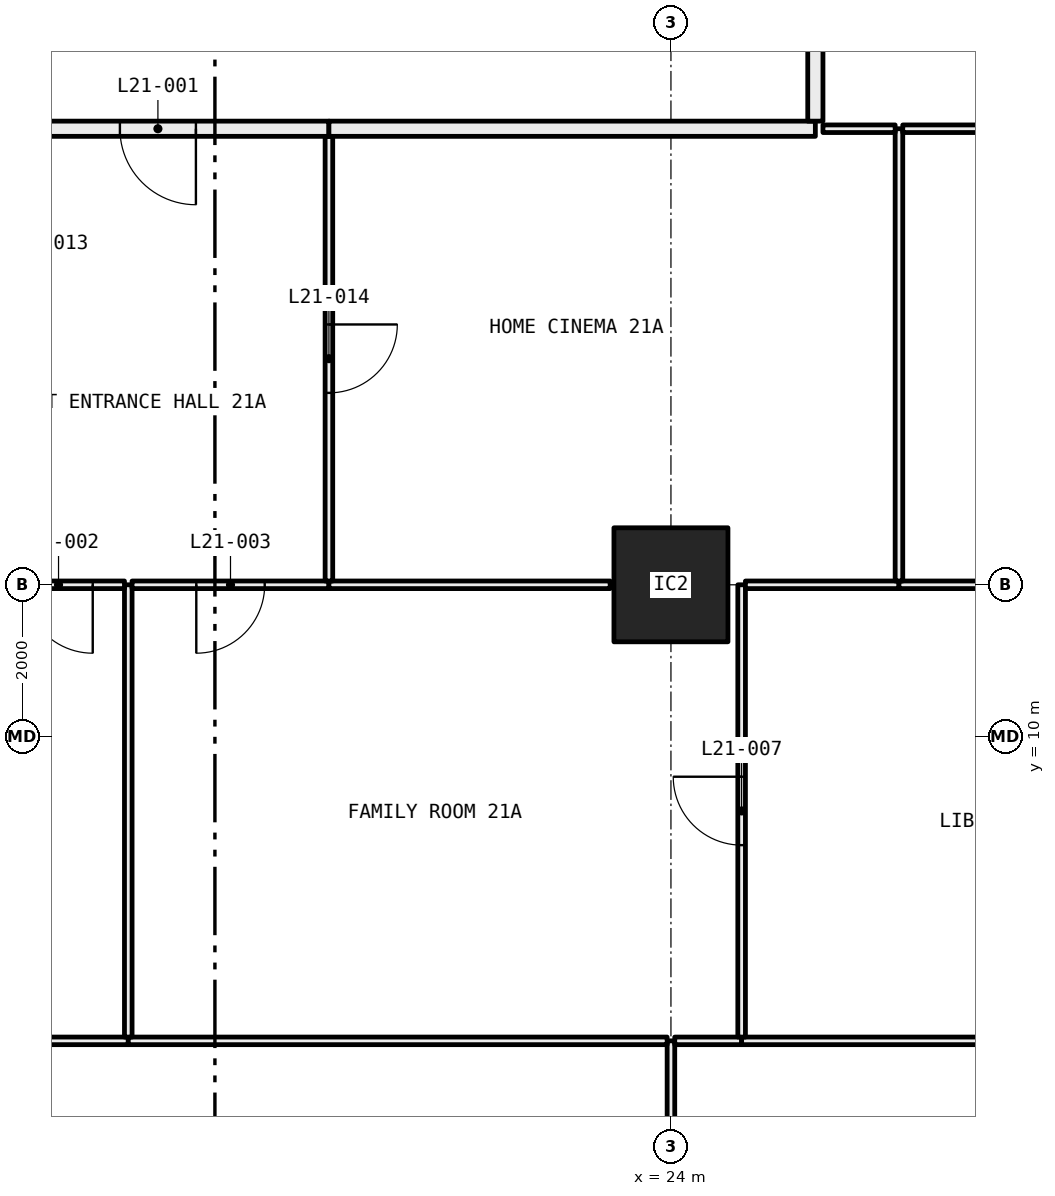
"""IFC4 building model, lengths in metres.
Left out: names, types, materials, properties, quantities, classifications, styles, units other than length and angle.
Written with IfcOpenShell. Run it as: python <this file> out.ifc"""

import sys

from ifc_helpers import new_model, si_unit, direction, frame, frame_2d, origin, origin_2d, place, context, subcontext, project, spatial, rectangle, hollow_rectangle, extrude, element, fill, save


model = new_model("IFC4")
c1 = context("Model", 3, precision=1e-05, world=origin(), true_north=direction((0.0, 1.0)))
c2 = subcontext(c1, "Body", "Model", "MODEL_VIEW")
j1 = project(units=[si_unit("LENGTHUNIT", "METRE"), si_unit("PLANEANGLEUNIT", "RADIAN")], contexts=[c1])
p1 = place(None, origin())
s1 = spatial("IfcSite", under=j1, at=p1, CompositionType="ELEMENT")
p2 = place(p1, origin())
s2 = spatial("IfcBuilding", under=s1, at=p2, CompositionType="ELEMENT")
p3 = place(p2, frame((0.0, 0.0, 85.2)))
s3 = spatial("IfcBuildingStorey", under=s2, at=p3, CompositionType="ELEMENT", Elevation=85.2)
p4 = place(p3, frame((24.0, 12.0, 0.0), z_axis=(0.0, 0.0, 1.0), x_axis=(1.0, 0.0, 0.0)))
e1 = element("IfcColumn", 1, at=p4, inside=s3, PredefinedType="COLUMN", context=c2, shape_type="SweptSolid", body=[
    extrude(hollow_rectangle(XDim=1.5, YDim=1.5, WallThickness=0.065, at=origin_2d()), origin(), (0.0, 0.0, 1.0), 3.05),
])
p5 = place(p3, frame((24.0, 0.72, 0.0), z_axis=(0.0, 0.0, 1.0), x_axis=(0.0, 1.0, 0.0)))
e2 = element("IfcWall", 2, at=p5, inside=s3, PredefinedType="PARTITIONING", context=c2, shape_type="SweptSolid", body=[
    extrude(rectangle(XDim=5.28, YDim=0.1, at=frame_2d((2.64, 0.0))), origin(), (0.0, 0.0, 1.0), 2.45),
])
p6 = place(p5, frame((2.19, 0.0, 0.0)))
e3 = element("IfcOpeningElement", 3, at=p6, cuts=e2, PredefinedType="OPENING", context=c2, shape_type="SweptSolid", body=[
    extrude(rectangle(XDim=0.9, YDim=2.1, at=frame_2d((0.45, 1.05))), frame((0.0, 0.06, 0.0), z_axis=(0.0, -1.0, 0.0), x_axis=(1.0, 0.0, 0.0)), (0.0, 0.0, 1.0), 0.12),
])
p7 = place(p3, frame((16.86, 6.0, 0.0), z_axis=(0.0, 0.0, 1.0), x_axis=(-1.0, 0.0, 0.0)))
e4 = element("IfcWall", 4, at=p7, inside=s3, PredefinedType="PARTITIONING", context=c2, shape_type="SweptSolid", body=[
    extrude(rectangle(XDim=4.81, YDim=0.1, at=frame_2d((2.405, 0.0))), origin(), (0.0, 0.0, 1.0), 2.45),
])
p8 = place(p7, frame((1.955, 0.0, 0.0)))
e5 = element("IfcOpeningElement", 5, at=p8, cuts=e4, PredefinedType="OPENING", context=c2, shape_type="SweptSolid", body=[
    extrude(rectangle(XDim=0.9, YDim=2.1, at=frame_2d((0.45, 1.05))), frame((0.0, 0.06, 0.0), z_axis=(0.0, -1.0, 0.0), x_axis=(1.0, 0.0, 0.0)), (0.0, 0.0, 1.0), 0.12),
])
p9 = place(p3, frame((23.95, 6.0, 0.0), z_axis=(0.0, 0.0, 1.0), x_axis=(-1.0, 0.0, 0.0)))
e6 = element("IfcWall", 6, at=p9, inside=s3, PredefinedType="PARTITIONING", context=c2, shape_type="SweptSolid", body=[
    extrude(rectangle(XDim=7.09, YDim=0.1, at=frame_2d((3.545, 0.0))), origin(), (0.0, 0.0, 1.0), 2.45),
])
p10 = place(p3, frame((24.93, 6.0, 0.0), z_axis=(0.0, 0.0, 1.0), x_axis=(-1.0, 0.0, 0.0)))
e7 = element("IfcWall", 7, at=p10, inside=s3, PredefinedType="PARTITIONING", context=c2, shape_type="SweptSolid", body=[
    extrude(rectangle(XDim=0.88, YDim=0.1, at=frame_2d((0.44, 0.0))), origin(), (0.0, 0.0, 1.0), 2.45),
])
p11 = place(p3, frame((29.95, 6.0, 0.0), z_axis=(0.0, 0.0, 1.0), x_axis=(-1.0, 0.0, 0.0)))
e8 = element("IfcWall", 8, at=p11, inside=s3, PredefinedType="PARTITIONING", context=c2, shape_type="SweptSolid", body=[
    extrude(rectangle(XDim=5.02, YDim=0.1, at=frame_2d((2.51, 0.0))), origin(), (0.0, 0.0, 1.0), 3.05),
])
p12 = place(p3, frame((16.86, 6.05, 0.0), z_axis=(0.0, 0.0, 1.0), x_axis=(0.0, 1.0, 0.0)))
e9 = element("IfcWall", 9, at=p12, inside=s3, PredefinedType="PARTITIONING", context=c2, shape_type="SweptSolid", body=[
    extrude(rectangle(XDim=5.95, YDim=0.1, at=frame_2d((2.975, 0.0))), origin(), (0.0, 0.0, 1.0), 2.45),
])
p13 = place(p3, frame((16.81, 12.0, 0.0), z_axis=(0.0, 0.0, 1.0), x_axis=(-1.0, 0.0, 0.0)))
e10 = element("IfcWall", 10, at=p13, inside=s3, PredefinedType="PARTITIONING", context=c2, shape_type="SweptSolid", body=[
    extrude(rectangle(XDim=1.735, YDim=0.1, at=frame_2d((0.868, 0.0))), origin(), (0.0, 0.0, 1.0), 2.45),
])
p14 = place(p13, frame((0.417, 0.0, 0.0)))
e11 = element("IfcOpeningElement", 11, at=p14, cuts=e10, PredefinedType="OPENING", context=c2, shape_type="SweptSolid", body=[
    extrude(rectangle(XDim=0.9, YDim=2.1, at=frame_2d((0.45, 1.05))), frame((0.0, 0.06, 0.0), z_axis=(0.0, -1.0, 0.0), x_axis=(1.0, 0.0, 0.0)), (0.0, 0.0, 1.0), 0.12),
])
p15 = place(p3, frame((24.93, 6.05, 0.0), z_axis=(0.0, 0.0, 1.0), x_axis=(0.0, 1.0, 0.0)))
e12 = element("IfcWall", 12, at=p15, inside=s3, PredefinedType="PARTITIONING", context=c2, shape_type="SweptSolid", body=[
    extrude(rectangle(XDim=5.95, YDim=0.1, at=frame_2d((2.975, 0.0))), origin(), (0.0, 0.0, 1.0), 2.45),
])
p16 = place(p15, frame((2.525, 0.0, 0.0)))
e13 = element("IfcOpeningElement", 13, at=p16, cuts=e12, PredefinedType="OPENING", context=c2, shape_type="SweptSolid", body=[
    extrude(rectangle(XDim=0.9, YDim=2.1, at=frame_2d((0.45, 1.05))), frame((0.0, 0.06, 0.0), z_axis=(0.0, -1.0, 0.0), x_axis=(1.0, 0.0, 0.0)), (0.0, 0.0, 1.0), 0.12),
])
p17 = place(p3, frame((19.5, 12.0, 0.0), z_axis=(0.0, 0.0, 1.0), x_axis=(-1.0, 0.0, 0.0)))
e14 = element("IfcWall", 14, at=p17, inside=s3, PredefinedType="PARTITIONING", context=c2, shape_type="SweptSolid", body=[
    extrude(rectangle(XDim=2.59, YDim=0.1, at=frame_2d((1.295, 0.0))), origin(), (0.0, 0.0, 1.0), 2.45),
])
p18 = place(p17, frame((0.845, 0.0, 0.0)))
e15 = element("IfcOpeningElement", 15, at=p18, cuts=e14, PredefinedType="OPENING", context=c2, shape_type="SweptSolid", body=[
    extrude(rectangle(XDim=0.9, YDim=2.1, at=frame_2d((0.45, 1.05))), frame((0.0, 0.06, 0.0), z_axis=(0.0, -1.0, 0.0), x_axis=(1.0, 0.0, 0.0)), (0.0, 0.0, 1.0), 0.12),
])
p19 = place(p3, frame((23.2, 12.0, 0.0), z_axis=(0.0, 0.0, 1.0), x_axis=(-1.0, 0.0, 0.0)))
e16 = element("IfcWall", 16, at=p19, inside=s3, PredefinedType="PARTITIONING", context=c2, shape_type="SweptSolid", body=[
    extrude(rectangle(XDim=3.7, YDim=0.1, at=frame_2d((1.85, 0.0))), origin(), (0.0, 0.0, 1.0), 2.45),
])
p20 = place(p3, frame((27.0, 12.0, 0.0), z_axis=(0.0, 0.0, 1.0), x_axis=(-1.0, 0.0, 0.0)))
e17 = element("IfcWall", 17, at=p20, inside=s3, PredefinedType="PARTITIONING", context=c2, shape_type="SweptSolid", body=[
    extrude(rectangle(XDim=2.02, YDim=0.1, at=frame_2d((1.01, 0.0))), origin(), (0.0, 0.0, 1.0), 2.45),
])
p21 = place(p3, frame((32.95, 12.0, 0.0), z_axis=(0.0, 0.0, 1.0), x_axis=(-1.0, 0.0, 0.0)))
e18 = element("IfcWall", 18, at=p21, inside=s3, PredefinedType="PARTITIONING", context=c2, shape_type="SweptSolid", body=[
    extrude(rectangle(XDim=5.95, YDim=0.1, at=frame_2d((2.975, 0.0))), origin(), (0.0, 0.0, 1.0), 2.45),
])
p22 = place(p21, frame((2.525, 0.0, 0.0)))
e19 = element("IfcOpeningElement", 19, at=p22, cuts=e18, PredefinedType="OPENING", context=c2, shape_type="SweptSolid", body=[
    extrude(rectangle(XDim=0.9, YDim=2.1, at=frame_2d((0.45, 1.05))), frame((0.0, 0.06, 0.0), z_axis=(0.0, -1.0, 0.0), x_axis=(1.0, 0.0, 0.0)), (0.0, 0.0, 1.0), 0.12),
])
p23 = place(p3, frame((19.5, 12.05, 0.0), z_axis=(0.0, 0.0, 1.0), x_axis=(0.0, 1.0, 0.0)))
e20 = element("IfcWall", 20, at=p23, inside=s3, PredefinedType="PARTITIONING", context=c2, shape_type="SweptSolid", body=[
    extrude(rectangle(XDim=5.85, YDim=0.1, at=frame_2d((2.925, 0.0))), origin(), (0.0, 0.0, 1.0), 2.45),
])
p24 = place(p23, frame((2.475, 0.0, 0.0)))
e21 = element("IfcOpeningElement", 21, at=p24, cuts=e20, PredefinedType="OPENING", context=c2, shape_type="SweptSolid", body=[
    extrude(rectangle(XDim=0.9, YDim=2.1, at=frame_2d((0.45, 1.05))), frame((0.0, 0.06, 0.0), z_axis=(0.0, -1.0, 0.0), x_axis=(1.0, 0.0, 0.0)), (0.0, 0.0, 1.0), 0.12),
])
p25 = place(p3, frame((19.5, 18.0, 0.0), z_axis=(0.0, 0.0, 1.0), x_axis=(-1.0, 0.0, 0.0)))
e22 = element("IfcWall", 22, at=p25, inside=s3, PredefinedType="PARTITIONING", context=c2, shape_type="SweptSolid", body=[
    extrude(rectangle(XDim=4.5, YDim=0.2, at=frame_2d((2.25, 0.0))), origin(), (0.0, 0.0, 1.0), 3.05),
])
p26 = place(p25, frame((1.75, 0.0, 0.0)))
e23 = element("IfcOpeningElement", 23, at=p26, cuts=e22, PredefinedType="OPENING", context=c2, shape_type="SweptSolid", body=[
    extrude(rectangle(XDim=1.0, YDim=2.1, at=frame_2d((0.5, 1.05))), frame((0.0, 0.11, 0.0), z_axis=(0.0, -1.0, 0.0), x_axis=(1.0, 0.0, 0.0)), (0.0, 0.0, 1.0), 0.22),
])
p27 = place(p3, frame((27.0, 12.05, 0.0), z_axis=(0.0, 0.0, 1.0), x_axis=(0.0, 1.0, 0.0)))
e24 = element("IfcWall", 24, at=p27, inside=s3, PredefinedType="PARTITIONING", context=c2, shape_type="SweptSolid", body=[
    extrude(rectangle(XDim=5.95, YDim=0.1, at=frame_2d((2.975, 0.0))), origin(), (0.0, 0.0, 1.0), 2.45),
])
p28 = place(p3, frame((26.95, 18.0, 0.0), z_axis=(0.0, 0.0, 1.0), x_axis=(-1.0, 0.0, 0.0)))
e25 = element("IfcWall", 25, at=p28, inside=s3, PredefinedType="PARTITIONING", context=c2, shape_type="SweptSolid", body=[
    extrude(rectangle(XDim=0.95, YDim=0.1, at=frame_2d((0.475, 0.0))), origin(), (0.0, 0.0, 1.0), 3.05),
])
p29 = place(p3, frame((25.9, 18.0, 0.0), z_axis=(0.0, 0.0, 1.0), x_axis=(-1.0, 0.0, 0.0)))
e26 = element("IfcWall", 26, at=p29, inside=s3, PredefinedType="PARTITIONING", context=c2, shape_type="SweptSolid", body=[
    extrude(rectangle(XDim=6.4, YDim=0.2, at=frame_2d((3.2, 0.0))), origin(), (0.0, 0.0, 1.0), 3.05),
])
p30 = place(p3, frame((30.0, 18.0, 0.0), z_axis=(0.0, 0.0, 1.0), x_axis=(-1.0, 0.0, 0.0)))
e27 = element("IfcWall", 27, at=p30, inside=s3, PredefinedType="PARTITIONING", context=c2, shape_type="SweptSolid", body=[
    extrude(rectangle(XDim=2.95, YDim=0.1, at=frame_2d((1.475, 0.0))), origin(), (0.0, 0.0, 1.0), 3.05),
])
p31 = place(p30, frame((1.025, 0.0, 0.0)))
e28 = element("IfcOpeningElement", 28, at=p31, cuts=e27, PredefinedType="OPENING", context=c2, shape_type="SweptSolid", body=[
    extrude(rectangle(XDim=0.9, YDim=2.1, at=frame_2d((0.45, 1.05))), frame((0.0, 0.06, 0.0), z_axis=(0.0, -1.0, 0.0), x_axis=(1.0, 0.0, 0.0)), (0.0, 0.0, 1.0), 0.12),
])
p32 = place(p3, frame((25.9, 23.9, 0.0), z_axis=(0.0, 0.0, 1.0), x_axis=(0.0, -1.0, 0.0)))
e29 = element("IfcWall", 29, at=p32, inside=s3, PredefinedType="PARTITIONING", context=c2, shape_type="SweptSolid", body=[
    extrude(rectangle(XDim=5.8, YDim=0.2, at=frame_2d((2.9, 0.0))), origin(), (0.0, 0.0, 1.0), 3.05),
])
p33 = place(p26, origin())
e30 = element("IfcDoor", 30, at=p33, inside=s3, OperationType="SINGLE_SWING_RIGHT", PredefinedType="DOOR", context=c2, shape_type="SweptSolid", body=[
    extrude(rectangle(XDim=1.0, YDim=2.1, at=frame_2d((0.5, 1.05))), frame((0.0, 0.025, 0.0), z_axis=(0.0, -1.0, 0.0), x_axis=(1.0, 0.0, 0.0)), (0.0, 0.0, 1.0), 0.05),
])
fill(e23, e30)
p34 = place(p14, origin())
e31 = element("IfcDoor", 31, at=p34, inside=s3, OperationType="SINGLE_SWING_RIGHT", PredefinedType="DOOR", context=c2, shape_type="SweptSolid", body=[
    extrude(rectangle(XDim=0.9, YDim=2.1, at=frame_2d((0.45, 1.05))), frame((0.0, 0.025, 0.0), z_axis=(0.0, -1.0, 0.0), x_axis=(1.0, 0.0, 0.0)), (0.0, 0.0, 1.0), 0.05),
])
fill(e11, e31)
p35 = place(p18, origin())
e32 = element("IfcDoor", 32, at=p35, inside=s3, OperationType="SINGLE_SWING_LEFT", PredefinedType="DOOR", context=c2, shape_type="SweptSolid", body=[
    extrude(rectangle(XDim=0.9, YDim=2.1, at=frame_2d((0.45, 1.05))), frame((0.0, 0.025, 0.0), z_axis=(0.0, -1.0, 0.0), x_axis=(1.0, 0.0, 0.0)), (0.0, 0.0, 1.0), 0.05),
])
fill(e15, e32)
p36 = place(p16, origin())
e33 = element("IfcDoor", 33, at=p36, inside=s3, OperationType="SINGLE_SWING_LEFT", PredefinedType="DOOR", context=c2, shape_type="SweptSolid", body=[
    extrude(rectangle(XDim=0.9, YDim=2.1, at=frame_2d((0.45, 1.05))), frame((0.0, 0.025, 0.0), z_axis=(0.0, -1.0, 0.0), x_axis=(1.0, 0.0, 0.0)), (0.0, 0.0, 1.0), 0.05),
])
fill(e13, e33)
p37 = place(p24, frame((0.9, 0.0, 0.0), x_axis=(-1.0, 0.0, 0.0)))
e34 = element("IfcDoor", 34, at=p37, inside=s3, OperationType="SINGLE_SWING_RIGHT", PredefinedType="DOOR", context=c2, shape_type="SweptSolid", body=[
    extrude(rectangle(XDim=0.9, YDim=2.1, at=frame_2d((0.45, 1.05))), frame((0.0, 0.025, 0.0), z_axis=(0.0, -1.0, 0.0), x_axis=(1.0, 0.0, 0.0)), (0.0, 0.0, 1.0), 0.05),
])
fill(e21, e34)
save(model, sys.argv[1])
